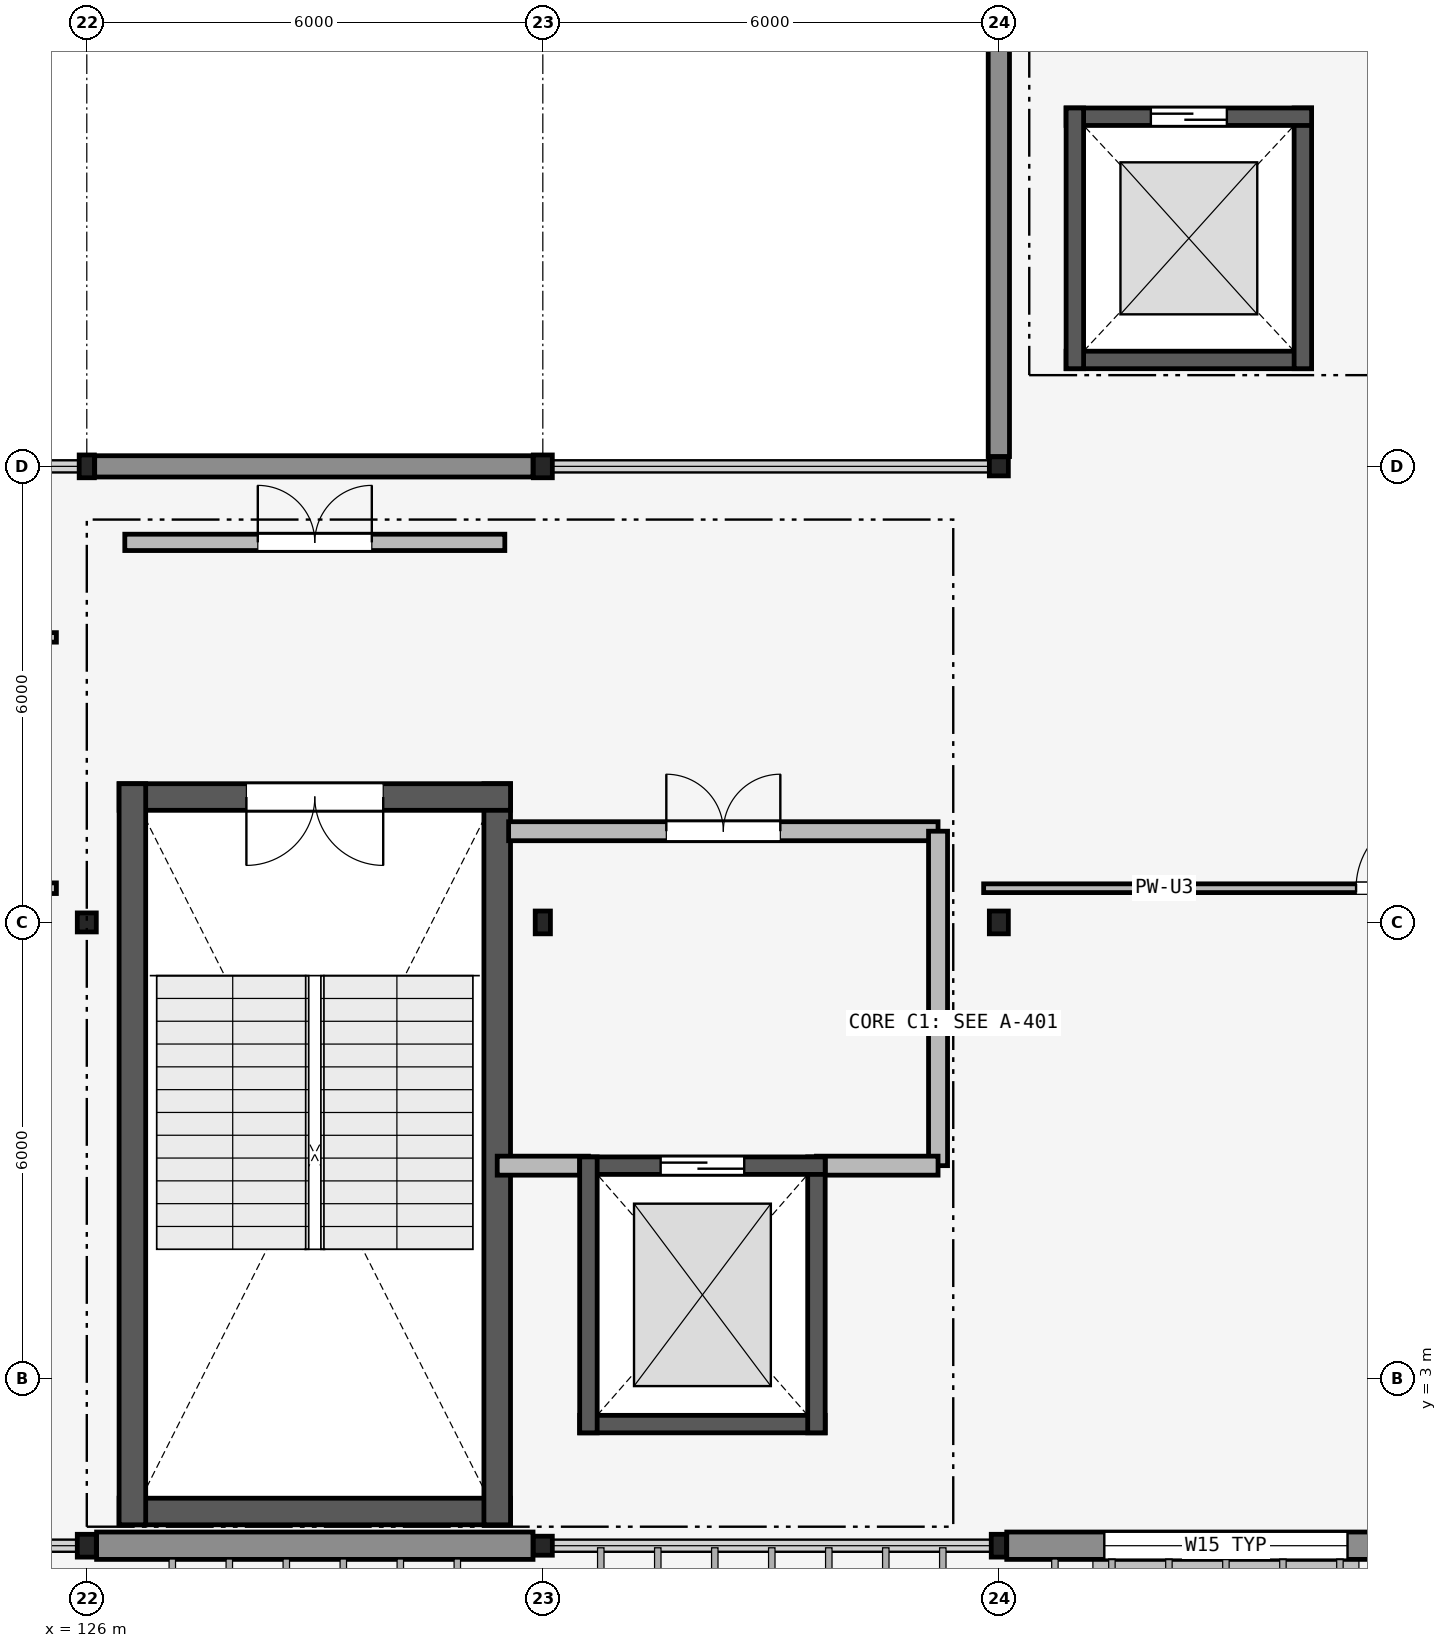
"""IFC4 building model, lengths in metres.
Left out: names, types, materials, properties, quantities, classifications, styles, units other than length and angle.
Written with IfcOpenShell. Run it as: python <this file> out.ifc"""

import sys

from ifc_helpers import new_model, si_unit, direction, frame, frame_2d, origin, origin_2d, place, context, subcontext, project, spatial, rectangle, hollow_rectangle, i_section, extrude, element, fill, save


model = new_model("IFC4")
c1 = context("Model", 3, precision=1e-05, world=origin(), true_north=direction((0.0, 1.0)))
c2 = subcontext(c1, "Body", "Model", "MODEL_VIEW")
j1 = project(units=[si_unit("LENGTHUNIT", "METRE"), si_unit("PLANEANGLEUNIT", "RADIAN")], contexts=[c1])
p1 = place(None, origin())
s1 = spatial("IfcSite", under=j1, at=p1, CompositionType="ELEMENT")
p2 = place(p1, origin())
s2 = spatial("IfcBuilding", under=s1, at=p2, CompositionType="ELEMENT")
p3 = place(p2, frame((0.0, 0.0, 26.1)))
s3 = spatial("IfcBuildingStorey", under=s2, at=p3, CompositionType="ELEMENT", Elevation=26.1)
p4 = place(p3, frame((126.0, 0.8, 0.0), z_axis=(0.0, 0.0, 1.0), x_axis=(1.0, 0.0, 0.0)))
e1 = element("IfcColumn", 1, at=p4, inside=s3, PredefinedType="COLUMN", context=c2, shape_type="SweptSolid", body=[
    extrude(i_section(OverallWidth=0.25, OverallDepth=0.3, WebThickness=0.01, FlangeThickness=0.01, FilletRadius=0.012, at=origin_2d()), origin(), (0.0, 0.0, 1.0), 3.9),
])
p5 = place(p3, frame((126.0, 9.0, 0.0), z_axis=(0.0, 0.0, 1.0), x_axis=(1.0, 0.0, 0.0)))
e2 = element("IfcColumn", 2, at=p5, inside=s3, PredefinedType="COLUMN", context=c2, shape_type="SweptSolid", body=[
    extrude(hollow_rectangle(XDim=0.25, YDim=0.25, WallThickness=0.012, InnerFilletRadius=0.012, OuterFilletRadius=0.024, at=origin_2d()), origin(), (0.0, 0.0, 1.0), 3.9),
])
p6 = place(p3, frame((126.0, 15.0, 0.0), z_axis=(0.0, 0.0, 1.0), x_axis=(1.0, 0.0, 0.0)))
e3 = element("IfcColumn", 3, at=p6, inside=s3, PredefinedType="COLUMN", context=c2, shape_type="SweptSolid", body=[
    extrude(hollow_rectangle(XDim=0.2, YDim=0.3, WallThickness=0.012, InnerFilletRadius=0.012, OuterFilletRadius=0.024, at=origin_2d()), origin(), (0.0, 0.0, 1.0), 3.9),
])
p7 = place(p3, frame((132.0, 0.8, 0.0), z_axis=(0.0, 0.0, 1.0), x_axis=(1.0, 0.0, 0.0)))
e4 = element("IfcColumn", 4, at=p7, inside=s3, PredefinedType="COLUMN", context=c2, shape_type="SweptSolid", body=[
    extrude(hollow_rectangle(XDim=0.25, YDim=0.25, WallThickness=0.012, InnerFilletRadius=0.012, OuterFilletRadius=0.024, at=origin_2d()), origin(), (0.0, 0.0, 1.0), 3.9),
])
p8 = place(p3, frame((132.0, 9.0, 0.0), z_axis=(0.0, 0.0, 1.0), x_axis=(1.0, 0.0, 0.0)))
e5 = element("IfcColumn", 5, at=p8, inside=s3, PredefinedType="COLUMN", context=c2, shape_type="SweptSolid", body=[
    extrude(hollow_rectangle(XDim=0.2, YDim=0.3, WallThickness=0.012, InnerFilletRadius=0.012, OuterFilletRadius=0.024, at=origin_2d()), origin(), (0.0, 0.0, 1.0), 3.9),
])
p9 = place(p3, frame((132.0, 15.0, 0.0), z_axis=(0.0, 0.0, 1.0), x_axis=(1.0, 0.0, 0.0)))
e6 = element("IfcColumn", 6, at=p9, inside=s3, PredefinedType="COLUMN", context=c2, shape_type="SweptSolid", body=[
    extrude(i_section(OverallWidth=0.25, OverallDepth=0.3, WebThickness=0.01, FlangeThickness=0.01, FilletRadius=0.012, at=origin_2d()), origin(), (0.0, 0.0, 1.0), 3.9),
])
p10 = place(p3, frame((138.0, 0.8, 0.0), z_axis=(0.0, 0.0, 1.0), x_axis=(1.0, 0.0, 0.0)))
e7 = element("IfcColumn", 7, at=p10, inside=s3, PredefinedType="COLUMN", context=c2, shape_type="SweptSolid", body=[
    extrude(hollow_rectangle(XDim=0.2, YDim=0.3, WallThickness=0.012, InnerFilletRadius=0.012, OuterFilletRadius=0.024, at=origin_2d()), origin(), (0.0, 0.0, 1.0), 3.9),
])
p11 = place(p3, frame((138.0, 9.0, 0.0), z_axis=(0.0, 0.0, 1.0), x_axis=(1.0, 0.0, 0.0)))
e8 = element("IfcColumn", 8, at=p11, inside=s3, PredefinedType="COLUMN", context=c2, shape_type="SweptSolid", body=[
    extrude(i_section(OverallWidth=0.25, OverallDepth=0.3, WebThickness=0.01, FlangeThickness=0.01, FilletRadius=0.012, at=origin_2d()), origin(), (0.0, 0.0, 1.0), 3.9),
])
p12 = place(p3, frame((138.0, 15.0, 0.0), z_axis=(0.0, 0.0, 1.0), x_axis=(1.0, 0.0, 0.0)))
e9 = element("IfcColumn", 9, at=p12, inside=s3, PredefinedType="COLUMN", context=c2, shape_type="SweptSolid", body=[
    extrude(hollow_rectangle(XDim=0.25, YDim=0.25, WallThickness=0.012, InnerFilletRadius=0.012, OuterFilletRadius=0.024, at=origin_2d()), origin(), (0.0, 0.0, 1.0), 3.9),
])
p13 = place(p3, frame((126.129, 0.8, 0.0), z_axis=(0.0, 0.0, 1.0), x_axis=(1.0, 0.0, 0.0)))
e10 = element("IfcWall", 10, at=p13, inside=s3, PredefinedType="SOLIDWALL", context=c2, shape_type="SweptSolid", body=[
    extrude(rectangle(XDim=5.742, YDim=0.36, at=frame_2d((2.871, 0.0))), origin(), (0.0, 0.0, 1.0), 3.28),
])
p14 = place(p3, frame((138.104, 0.8, 0.0), z_axis=(0.0, 0.0, 1.0), x_axis=(1.0, 0.0, 0.0)))
e11 = element("IfcWall", 11, at=p14, inside=s3, PredefinedType="SOLIDWALL", context=c2, shape_type="SweptSolid", body=[
    extrude(rectangle(XDim=5.767, YDim=0.36, at=frame_2d((2.884, 0.0))), origin(), (0.0, 0.0, 1.0), 3.28),
])
p15 = place(p14, frame((1.283, 0.0, 0.8)))
e12 = element("IfcOpeningElement", 12, at=p15, cuts=e11, PredefinedType="OPENING", context=c2, shape_type="SweptSolid", body=[
    extrude(rectangle(XDim=3.2, YDim=1.8, at=frame_2d((1.6, 0.9))), frame((0.0, 0.19, 0.0), z_axis=(0.0, -1.0, 0.0), x_axis=(1.0, 0.0, 0.0)), (0.0, 0.0, 1.0), 0.38),
])
p16 = place(p3, frame((126.104, 15.0, 0.0), z_axis=(0.0, 0.0, 1.0), x_axis=(1.0, 0.0, 0.0)))
e13 = element("IfcWall", 13, at=p16, inside=s3, PredefinedType="SOLIDWALL", context=c2, shape_type="SweptSolid", body=[
    extrude(rectangle(XDim=5.767, YDim=0.28, at=frame_2d((2.884, 0.0))), origin(), (0.0, 0.0, 1.0), 3.13),
])
p17 = place(p3, frame((138.0, 15.129, 0.0), z_axis=(0.0, 0.0, 1.0), x_axis=(0.0, 1.0, 0.0)))
e14 = element("IfcWall", 14, at=p17, inside=s3, PredefinedType="SOLIDWALL", context=c2, shape_type="SweptSolid", body=[
    extrude(rectangle(XDim=5.717, YDim=0.28, at=frame_2d((2.858, 0.0))), origin(), (0.0, 0.0, 1.0), 3.08),
])
p18 = place(p3, frame((126.425, 1.25, 0.0), z_axis=(0.0, 0.0, 1.0), x_axis=(1.0, 0.0, 0.0)))
e15 = element("IfcWall", 15, at=p18, inside=s3, PredefinedType="SHEAR", context=c2, shape_type="SweptSolid", body=[
    extrude(rectangle(XDim=5.15, YDim=0.35, at=frame_2d((2.575, 0.0))), origin(), (0.0, 0.0, 1.0), 3.76),
])
p19 = place(p3, frame((131.4, 1.075, 0.0), z_axis=(0.0, 0.0, 1.0), x_axis=(0.0, 1.0, 0.0)))
e16 = element("IfcWall", 16, at=p19, inside=s3, PredefinedType="SHEAR", context=c2, shape_type="SweptSolid", body=[
    extrude(rectangle(XDim=9.75, YDim=0.35, at=frame_2d((4.875, 0.0))), origin(), (0.0, 0.0, 1.0), 3.76),
])
p20 = place(p3, frame((131.575, 10.65, 0.0), z_axis=(0.0, 0.0, 1.0), x_axis=(-1.0, 0.0, 0.0)))
e17 = element("IfcWall", 17, at=p20, inside=s3, PredefinedType="SHEAR", context=c2, shape_type="SweptSolid", body=[
    extrude(rectangle(XDim=5.15, YDim=0.35, at=frame_2d((2.575, 0.0))), origin(), (0.0, 0.0, 1.0), 3.76),
])
p21 = place(p20, frame((1.675, 0.0, 0.0)))
e18 = element("IfcOpeningElement", 18, at=p21, cuts=e17, PredefinedType="OPENING", context=c2, shape_type="SweptSolid", body=[
    extrude(rectangle(XDim=1.8, YDim=2.2, at=frame_2d((0.9, 1.1))), frame((0.0, 0.185, 0.0), z_axis=(0.0, -1.0, 0.0), x_axis=(1.0, 0.0, 0.0)), (0.0, 0.0, 1.0), 0.37),
])
p22 = place(p3, frame((126.6, 10.825, 0.0), z_axis=(0.0, 0.0, 1.0), x_axis=(0.0, -1.0, 0.0)))
e19 = element("IfcWall", 19, at=p22, inside=s3, PredefinedType="SHEAR", context=c2, shape_type="SweptSolid", body=[
    extrude(rectangle(XDim=9.75, YDim=0.35, at=frame_2d((4.875, 0.0))), origin(), (0.0, 0.0, 1.0), 3.76),
])
p23 = place(p3, frame((126.5, 14.0, 0.0), z_axis=(0.0, 0.0, 1.0), x_axis=(1.0, 0.0, 0.0)))
e20 = element("IfcWall", 20, at=p23, inside=s3, PredefinedType="PARTITIONING", context=c2, shape_type="SweptSolid", body=[
    extrude(rectangle(XDim=5.0, YDim=0.215, at=frame_2d((2.5, 0.0))), origin(), (0.0, 0.0, 1.0), 3.68),
])
p24 = place(p23, frame((1.75, 0.0, 0.0)))
e21 = element("IfcOpeningElement", 21, at=p24, cuts=e20, PredefinedType="OPENING", context=c2, shape_type="SweptSolid", body=[
    extrude(rectangle(XDim=1.5, YDim=2.15, at=frame_2d((0.75, 1.075))), frame((0.0, 0.117, 0.0), z_axis=(0.0, -1.0, 0.0), x_axis=(1.0, 0.0, 0.0)), (0.0, 0.0, 1.0), 0.235),
])
p25 = place(p3, frame((131.55, 10.2, 0.0), z_axis=(0.0, 0.0, 1.0), x_axis=(1.0, 0.0, 0.0)))
e22 = element("IfcWall", 22, at=p25, inside=s3, PredefinedType="PARTITIONING", context=c2, shape_type="SweptSolid", body=[
    extrude(rectangle(XDim=5.65, YDim=0.25, at=frame_2d((2.825, 0.0))), origin(), (0.0, 0.0, 1.0), 3.273),
])
p26 = place(p25, frame((2.075, 0.0, 0.0)))
e23 = element("IfcOpeningElement", 23, at=p26, cuts=e22, PredefinedType="OPENING", context=c2, shape_type="SweptSolid", body=[
    extrude(rectangle(XDim=1.5, YDim=2.15, at=frame_2d((0.75, 1.075))), frame((0.0, 0.135, 0.0), z_axis=(0.0, -1.0, 0.0), x_axis=(1.0, 0.0, 0.0)), (0.0, 0.0, 1.0), 0.27),
])
p27 = place(p3, frame((137.2, 5.8, 0.0), z_axis=(0.0, 0.0, 1.0), x_axis=(0.0, 1.0, 0.0)))
e24 = element("IfcWall", 24, at=p27, inside=s3, PredefinedType="PARTITIONING", context=c2, shape_type="SweptSolid", body=[
    extrude(rectangle(XDim=4.4, YDim=0.25, at=frame_2d((2.2, 0.0))), origin(), (0.0, 0.0, 1.0), 3.28),
])
p28 = place(p3, frame((135.6, 5.8, 0.0), z_axis=(0.0, 0.0, 1.0), x_axis=(1.0, 0.0, 0.0)))
e25 = element("IfcWall", 25, at=p28, inside=s3, PredefinedType="PARTITIONING", context=c2, shape_type="SweptSolid", body=[
    extrude(rectangle(XDim=1.6, YDim=0.25, at=frame_2d((0.8, 0.0))), origin(), (0.0, 0.0, 1.0), 3.68),
])
p29 = place(p3, frame((131.4, 5.8, 0.0), z_axis=(0.0, 0.0, 1.0), x_axis=(1.0, 0.0, 0.0)))
e26 = element("IfcWall", 26, at=p29, inside=s3, PredefinedType="PARTITIONING", context=c2, shape_type="SweptSolid", body=[
    extrude(rectangle(XDim=1.2, YDim=0.25, at=frame_2d((0.6, 0.0))), origin(), (0.0, 0.0, 1.0), 3.28),
])
p30 = place(p3, frame((132.485, 2.4, 0.0), z_axis=(0.0, 0.0, 1.0), x_axis=(1.0, 0.0, 0.0)))
e27 = element("IfcWall", 27, at=p30, inside=s3, PredefinedType="SHEAR", context=c2, shape_type="SweptSolid", body=[
    extrude(rectangle(XDim=3.23, YDim=0.23, at=frame_2d((1.615, 0.0))), origin(), (0.0, 0.0, 1.0), 3.9),
])
p31 = place(p3, frame((135.6, 2.285, 0.0), z_axis=(0.0, 0.0, 1.0), x_axis=(0.0, 1.0, 0.0)))
e28 = element("IfcWall", 28, at=p31, inside=s3, PredefinedType="SHEAR", context=c2, shape_type="SweptSolid", body=[
    extrude(rectangle(XDim=3.63, YDim=0.23, at=frame_2d((1.815, 0.0))), origin(), (0.0, 0.0, 1.0), 3.9),
])
p32 = place(p3, frame((135.715, 5.8, 0.0), z_axis=(0.0, 0.0, 1.0), x_axis=(-1.0, 0.0, 0.0)))
e29 = element("IfcWall", 29, at=p32, inside=s3, PredefinedType="SHEAR", context=c2, shape_type="SweptSolid", body=[
    extrude(rectangle(XDim=3.23, YDim=0.23, at=frame_2d((1.615, 0.0))), origin(), (0.0, 0.0, 1.0), 3.9),
])
p33 = place(p32, frame((1.065, 0.0, 0.0)))
e30 = element("IfcOpeningElement", 30, at=p33, cuts=e29, PredefinedType="OPENING", context=c2, shape_type="SweptSolid", body=[
    extrude(rectangle(XDim=1.1, YDim=2.2, at=frame_2d((0.55, 1.1))), frame((0.0, 0.125, 0.0), z_axis=(0.0, -1.0, 0.0), x_axis=(1.0, 0.0, 0.0)), (0.0, 0.0, 1.0), 0.25),
])
p34 = place(p3, frame((132.6, 5.915, 0.0), z_axis=(0.0, 0.0, 1.0), x_axis=(0.0, -1.0, 0.0)))
e31 = element("IfcWall", 31, at=p34, inside=s3, PredefinedType="SHEAR", context=c2, shape_type="SweptSolid", body=[
    extrude(rectangle(XDim=3.63, YDim=0.23, at=frame_2d((1.815, 0.0))), origin(), (0.0, 0.0, 1.0), 3.9),
])
p35 = place(p3, frame((138.885, 16.4, 0.0), z_axis=(0.0, 0.0, 1.0), x_axis=(1.0, 0.0, 0.0)))
e32 = element("IfcWall", 32, at=p35, inside=s3, PredefinedType="SHEAR", context=c2, shape_type="SweptSolid", body=[
    extrude(rectangle(XDim=3.23, YDim=0.23, at=frame_2d((1.615, 0.0))), origin(), (0.0, 0.0, 1.0), 3.9),
])
p36 = place(p3, frame((142.0, 16.285, 0.0), z_axis=(0.0, 0.0, 1.0), x_axis=(0.0, 1.0, 0.0)))
e33 = element("IfcWall", 33, at=p36, inside=s3, PredefinedType="SHEAR", context=c2, shape_type="SweptSolid", body=[
    extrude(rectangle(XDim=3.43, YDim=0.23, at=frame_2d((1.715, 0.0))), origin(), (0.0, 0.0, 1.0), 3.9),
])
p37 = place(p3, frame((142.115, 19.6, 0.0), z_axis=(0.0, 0.0, 1.0), x_axis=(-1.0, 0.0, 0.0)))
e34 = element("IfcWall", 34, at=p37, inside=s3, PredefinedType="SHEAR", context=c2, shape_type="SweptSolid", body=[
    extrude(rectangle(XDim=3.23, YDim=0.23, at=frame_2d((1.615, 0.0))), origin(), (0.0, 0.0, 1.0), 3.9),
])
p38 = place(p37, frame((1.115, 0.0, 0.0)))
e35 = element("IfcOpeningElement", 35, at=p38, cuts=e34, PredefinedType="OPENING", context=c2, shape_type="SweptSolid", body=[
    extrude(rectangle(XDim=1.0, YDim=2.15, at=frame_2d((0.5, 1.075))), frame((0.0, 0.125, 0.0), z_axis=(0.0, -1.0, 0.0), x_axis=(1.0, 0.0, 0.0)), (0.0, 0.0, 1.0), 0.25),
])
p39 = place(p3, frame((139.0, 19.715, 0.0), z_axis=(0.0, 0.0, 1.0), x_axis=(0.0, -1.0, 0.0)))
e36 = element("IfcWall", 36, at=p39, inside=s3, PredefinedType="SHEAR", context=c2, shape_type="SweptSolid", body=[
    extrude(rectangle(XDim=3.43, YDim=0.23, at=frame_2d((1.715, 0.0))), origin(), (0.0, 0.0, 1.0), 3.9),
])
p40 = place(p3, frame((108.5, 9.45, 0.0), z_axis=(0.0, 0.0, 1.0), x_axis=(1.0, 0.0, 0.0)))
e37 = element("IfcWall", 37, at=p40, inside=s3, PredefinedType="PARTITIONING", context=c2, shape_type="SweptSolid", body=[
    extrude(rectangle(XDim=17.1, YDim=0.14, at=frame_2d((8.55, 0.0))), origin(), (0.0, 0.0, 1.0), 3.273),
])
p41 = place(p40, frame((8.025, 0.0, 0.0)))
e38 = element("IfcOpeningElement", 38, at=p41, cuts=e37, PredefinedType="OPENING", context=c2, shape_type="SweptSolid", body=[
    extrude(rectangle(XDim=1.05, YDim=2.2, at=frame_2d((0.525, 1.1))), frame((0.0, 0.08, 0.0), z_axis=(0.0, -1.0, 0.0), x_axis=(1.0, 0.0, 0.0)), (0.0, 0.0, 1.0), 0.16),
])
p42 = place(p3, frame((137.8, 9.45, 0.0), z_axis=(0.0, 0.0, 1.0), x_axis=(1.0, 0.0, 0.0)))
e39 = element("IfcWall", 39, at=p42, inside=s3, PredefinedType="PARTITIONING", context=c2, shape_type="SweptSolid", body=[
    extrude(rectangle(XDim=10.8, YDim=0.115, at=frame_2d((5.4, 0.0))), origin(), (0.0, 0.0, 1.0), 3.273),
])
p43 = place(p42, frame((4.9, 0.0, 0.0)))
e40 = element("IfcOpeningElement", 40, at=p43, cuts=e39, PredefinedType="OPENING", context=c2, shape_type="SweptSolid", body=[
    extrude(rectangle(XDim=1.0, YDim=2.15, at=frame_2d((0.5, 1.075))), frame((0.0, 0.067, 0.0), z_axis=(0.0, -1.0, 0.0), x_axis=(1.0, 0.0, 0.0)), (0.0, 0.0, 1.0), 0.135),
])
p44 = place(p3, frame((125.6, 12.75, 0.0), z_axis=(0.0, 0.0, 1.0), x_axis=(-1.0, 0.0, 0.0)))
e41 = element("IfcWall", 41, at=p44, inside=s3, PredefinedType="PARTITIONING", context=c2, shape_type="SweptSolid", body=[
    extrude(rectangle(XDim=17.1, YDim=0.125, at=frame_2d((8.55, 0.0))), origin(), (0.0, 0.0, 1.0), 3.273),
])
p45 = place(p44, frame((7.775, 0.0, 0.0)))
e42 = element("IfcOpeningElement", 42, at=p45, cuts=e41, PredefinedType="OPENING", context=c2, shape_type="SweptSolid", body=[
    extrude(rectangle(XDim=1.55, YDim=2.2, at=frame_2d((0.775, 1.1))), frame((0.0, 0.073, 0.0), z_axis=(0.0, -1.0, 0.0), x_axis=(1.0, 0.0, 0.0)), (0.0, 0.0, 1.0), 0.145),
])
p46 = place(p15, origin())
e43 = element("IfcWindow", 43, at=p46, inside=s3, PartitioningType="SINGLE_PANEL", PredefinedType="WINDOW", context=c2, shape_type="SweptSolid", body=[
    extrude(rectangle(XDim=3.2, YDim=1.8, at=frame_2d((1.6, 0.9))), frame((0.0, 0.03, 0.0), z_axis=(0.0, -1.0, 0.0), x_axis=(1.0, 0.0, 0.0)), (0.0, 0.0, 1.0), 0.06),
])
fill(e12, e43)
p47 = place(p21, origin())
e44 = element("IfcDoor", 44, at=p47, inside=s3, OperationType="DOUBLE_DOOR_SINGLE_SWING", PredefinedType="DOOR", context=c2, shape_type="SweptSolid", body=[
    extrude(rectangle(XDim=1.8, YDim=2.2, at=frame_2d((0.9, 1.1))), frame((0.0, 0.025, 0.0), z_axis=(0.0, -1.0, 0.0), x_axis=(1.0, 0.0, 0.0)), (0.0, 0.0, 1.0), 0.05),
])
fill(e18, e44)
p48 = place(p24, origin())
e45 = element("IfcDoor", 45, at=p48, inside=s3, OperationType="DOUBLE_DOOR_SINGLE_SWING", PredefinedType="DOOR", context=c2, shape_type="SweptSolid", body=[
    extrude(rectangle(XDim=1.5, YDim=2.15, at=frame_2d((0.75, 1.075))), frame((0.0, 0.025, 0.0), z_axis=(0.0, -1.0, 0.0), x_axis=(1.0, 0.0, 0.0)), (0.0, 0.0, 1.0), 0.05),
])
fill(e21, e45)
p49 = place(p26, origin())
e46 = element("IfcDoor", 46, at=p49, inside=s3, OperationType="DOUBLE_DOOR_SINGLE_SWING", PredefinedType="DOOR", context=c2, shape_type="SweptSolid", body=[
    extrude(rectangle(XDim=1.5, YDim=2.15, at=frame_2d((0.75, 1.075))), frame((0.0, 0.025, 0.0), z_axis=(0.0, -1.0, 0.0), x_axis=(1.0, 0.0, 0.0)), (0.0, 0.0, 1.0), 0.05),
])
fill(e23, e46)
p50 = place(p33, origin())
e47 = element("IfcDoor", 47, at=p50, inside=s3, OperationType="SLIDING_TO_LEFT", PredefinedType="DOOR", context=c2, shape_type="SweptSolid", body=[
    extrude(rectangle(XDim=1.1, YDim=2.2, at=frame_2d((0.55, 1.1))), frame((0.0, 0.025, 0.0), z_axis=(0.0, -1.0, 0.0), x_axis=(1.0, 0.0, 0.0)), (0.0, 0.0, 1.0), 0.05),
])
fill(e30, e47)
p51 = place(p38, origin())
e48 = element("IfcDoor", 48, at=p51, inside=s3, OperationType="SLIDING_TO_LEFT", PredefinedType="DOOR", context=c2, shape_type="SweptSolid", body=[
    extrude(rectangle(XDim=1.0, YDim=2.15, at=frame_2d((0.5, 1.075))), frame((0.0, 0.025, 0.0), z_axis=(0.0, -1.0, 0.0), x_axis=(1.0, 0.0, 0.0)), (0.0, 0.0, 1.0), 0.05),
])
fill(e35, e48)
p52 = place(p43, origin())
e49 = element("IfcDoor", 49, at=p52, inside=s3, OperationType="SINGLE_SWING_RIGHT", PredefinedType="DOOR", context=c2, shape_type="SweptSolid", body=[
    extrude(rectangle(XDim=1.0, YDim=2.15, at=frame_2d((0.5, 1.075))), frame((0.0, 0.025, 0.0), z_axis=(0.0, -1.0, 0.0), x_axis=(1.0, 0.0, 0.0)), (0.0, 0.0, 1.0), 0.05),
])
fill(e40, e49)
save(model, sys.argv[1])
